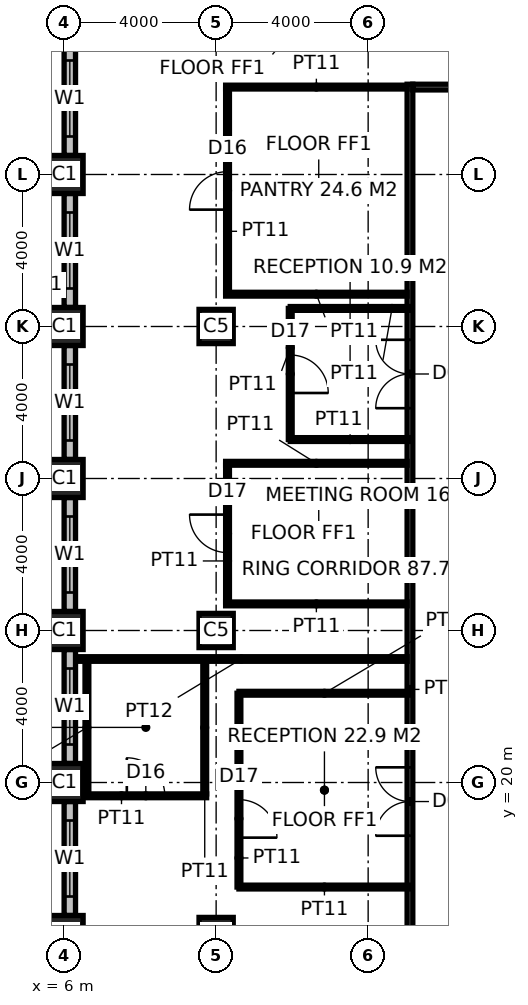
"""IFC4 building model, lengths in metres.
Left out: names, types, materials, properties, quantities, classifications, styles, units other than length and angle.
Written with IfcOpenShell. Run it as: python <this file> out.ifc"""

import sys

from ifc_helpers import new_model, si_unit, direction, frame, frame_2d, origin, origin_2d, place, context, subcontext, project, spatial, rectangle, hollow_rectangle, extrude, element, fill, save


model = new_model("IFC4")
c1 = context("Model", 3, precision=1e-05, world=origin(), true_north=direction((0.0, 1.0)))
c2 = subcontext(c1, "Body", "Model", "MODEL_VIEW")
j1 = project(units=[si_unit("LENGTHUNIT", "METRE"), si_unit("PLANEANGLEUNIT", "RADIAN")], contexts=[c1])
p1 = place(None, origin())
s1 = spatial("IfcSite", under=j1, at=p1, CompositionType="ELEMENT")
p2 = place(p1, origin())
s2 = spatial("IfcBuilding", under=s1, at=p2, CompositionType="ELEMENT")
p3 = place(p2, frame((0.0, 0.0, 175.8)))
s3 = spatial("IfcBuildingStorey", under=s2, at=p3, CompositionType="ELEMENT", Elevation=175.8)
for number, where, z_axis, x_axis in (
    (1, (6.0, 16.0, 0.0), (0.0, 0.0, 1.0), (1.0, 0.0, 0.0)),
    (2, (6.0, 20.0, 0.0), (0.0, 0.0, 1.0), (1.0, 0.0, 0.0)),
    (3, (6.0, 24.0, 0.0), (0.0, 0.0, 1.0), (1.0, 0.0, 0.0)),
    (4, (6.0, 28.0, 0.0), (0.0, 0.0, 1.0), (1.0, 0.0, 0.0)),
    (5, (6.0, 32.0, 0.0), (0.0, 0.0, 1.0), (1.0, 0.0, 0.0)),
    (6, (6.0, 36.0, 0.0), (0.0, 0.0, 1.0), (1.0, 0.0, 0.0)),
):
    element("IfcColumn", number, at=place(p3, frame(where, z_axis=z_axis, x_axis=x_axis)), inside=s3, PredefinedType="COLUMN", context=c2, shape_type="SweptSolid", body=[
        extrude(hollow_rectangle(XDim=1.0, YDim=1.0, WallThickness=0.1, at=origin_2d()), origin(), (0.0, 0.0, 1.0), 4.0),
    ])
for number, where, z_axis, x_axis in (
    (7, (10.0, 16.0, 0.0), (0.0, 0.0, 1.0), (1.0, 0.0, 0.0)),
    (8, (10.0, 24.0, 0.0), (0.0, 0.0, 1.0), (1.0, 0.0, 0.0)),
    (9, (10.0, 32.0, 0.0), (0.0, 0.0, 1.0), (1.0, 0.0, 0.0)),
):
    element("IfcColumn", number, at=place(p3, frame(where, z_axis=z_axis, x_axis=x_axis)), inside=s3, PredefinedType="COLUMN", context=c2, shape_type="SweptSolid", body=[
        extrude(hollow_rectangle(XDim=0.9, YDim=0.9, WallThickness=0.1, at=origin_2d()), origin(), (0.0, 0.0, 1.0), 4.0),
    ])
p4 = place(p3, frame((15.1, 15.625, 0.0), z_axis=(0.0, 0.0, 1.0), x_axis=(0.0, 1.0, 0.0)))
e10 = element("IfcWall", 10, at=p4, inside=s3, PredefinedType="PARTITIONING", context=c2, shape_type="SweptSolid", body=[
    extrude(rectangle(XDim=22.75, YDim=0.15, at=frame_2d((11.375, 0.0))), origin(), (0.0, 0.0, 1.0), 3.85),
])
p5 = place(p4, frame((2.974, 0.0, 0.0)))
e11 = element("IfcOpeningElement", 11, at=p5, cuts=e10, PredefinedType="OPENING", context=c2, shape_type="SweptSolid", body=[
    extrude(rectangle(XDim=1.8, YDim=2.4, at=frame_2d((0.9, 1.2))), frame((0.0, 0.085, 0.0), z_axis=(0.0, -1.0, 0.0), x_axis=(1.0, 0.0, 0.0)), (0.0, 0.0, 1.0), 0.17),
])
p6 = place(p4, frame((14.225, 0.0, 0.0)))
e12 = element("IfcOpeningElement", 12, at=p6, cuts=e10, PredefinedType="OPENING", context=c2, shape_type="SweptSolid", body=[
    extrude(rectangle(XDim=1.8, YDim=2.4, at=frame_2d((0.9, 1.2))), frame((0.0, 0.085, 0.0), z_axis=(0.0, -1.0, 0.0), x_axis=(1.0, 0.0, 0.0)), (0.0, 0.0, 1.0), 0.17),
])
p7 = place(p3, frame((15.175, 38.3, 0.0), z_axis=(0.0, 0.0, 1.0), x_axis=(1.0, 0.0, 0.0)))
e13 = element("IfcWall", 13, at=p7, inside=s3, PredefinedType="PARTITIONING", context=c2, shape_type="SweptSolid", body=[
    extrude(rectangle(XDim=22.65, YDim=0.15, at=frame_2d((11.325, 0.0))), origin(), (0.0, 0.0, 1.0), 3.85),
])
p8 = place(p7, frame((8.575, 0.0, 0.0)))
e14 = element("IfcOpeningElement", 14, at=p8, cuts=e13, PredefinedType="OPENING", context=c2, shape_type="SweptSolid", body=[
    extrude(rectangle(XDim=0.9, YDim=2.1, at=frame_2d((0.45, 1.05))), frame((0.0, 0.085, 0.0), z_axis=(0.0, -1.0, 0.0), x_axis=(1.0, 0.0, 0.0)), (0.0, 0.0, 1.0), 0.17),
])
p9 = place(p7, frame((12.325, 0.0, 0.0)))
e15 = element("IfcOpeningElement", 15, at=p9, cuts=e13, PredefinedType="OPENING", context=c2, shape_type="SweptSolid", body=[
    extrude(rectangle(XDim=1.0, YDim=2.1, at=frame_2d((0.5, 1.05))), frame((0.0, 0.085, 0.0), z_axis=(0.0, -1.0, 0.0), x_axis=(1.0, 0.0, 0.0)), (0.0, 0.0, 1.0), 0.17),
])
p10 = place(p7, frame((16.175, 0.0, 0.0)))
e16 = element("IfcOpeningElement", 16, at=p10, cuts=e13, PredefinedType="OPENING", context=c2, shape_type="SweptSolid", body=[
    extrude(rectangle(XDim=0.9, YDim=2.1, at=frame_2d((0.45, 1.05))), frame((0.0, 0.085, 0.0), z_axis=(0.0, -1.0, 0.0), x_axis=(1.0, 0.0, 0.0)), (0.0, 0.0, 1.0), 0.17),
])
p11 = place(p3, frame((6.3, 23.25, 0.0), z_axis=(0.0, 0.0, 1.0), x_axis=(1.0, 0.0, 0.0)))
e17 = element("IfcWall", 17, at=p11, inside=s3, PredefinedType="PARTITIONING", context=c2, shape_type="SweptSolid", body=[
    extrude(rectangle(XDim=8.725, YDim=0.12, at=frame_2d((4.362, 0.0))), origin(), (0.0, 0.0, 1.0), 3.85),
])
p12 = place(p3, frame((6.55, 19.65, 0.0), z_axis=(0.0, 0.0, 1.0), x_axis=(1.0, 0.0, 0.0)))
e18 = element("IfcWall", 18, at=p12, inside=s3, PredefinedType="PARTITIONING", context=c2, shape_type="SweptSolid", body=[
    extrude(rectangle(XDim=3.2, YDim=0.1, at=frame_2d((1.6, 0.0))), origin(), (0.0, 0.0, 1.0), 2.85),
])
p13 = place(p12, frame((1.1, 0.0, 0.0)))
e19 = element("IfcOpeningElement", 19, at=p13, cuts=e18, PredefinedType="OPENING", context=c2, shape_type="SweptSolid", body=[
    extrude(rectangle(XDim=1.0, YDim=2.2, at=frame_2d((0.5, 1.1))), frame((0.0, 0.06, 0.0), z_axis=(0.0, -1.0, 0.0), x_axis=(1.0, 0.0, 0.0)), (0.0, 0.0, 1.0), 0.12),
])
for number, where, z_axis, x_axis in (
    (20, (10.25, 24.7, 0.0), (0.0, 0.0, 1.0), (1.0, 0.0, 0.0)),
    (21, (10.25, 28.4, 0.0), (0.0, 0.0, 1.0), (1.0, 0.0, 0.0)),
    (22, (10.25, 32.85, 0.0), (0.0, 0.0, 1.0), (1.0, 0.0, 0.0)),
    (23, (10.25, 38.3, 0.0), (0.0, 0.0, 1.0), (1.0, 0.0, 0.0)),
):
    element("IfcWall", number, at=place(p3, frame(where, z_axis=z_axis, x_axis=x_axis)), inside=s3, PredefinedType="PARTITIONING", context=c2, shape_type="SweptSolid", body=[
        extrude(rectangle(XDim=4.775, YDim=0.1, at=frame_2d((2.387, 0.0))), origin(), (0.0, 0.0, 1.0), 3.85),
    ])
for number, where, z_axis, x_axis in (
    (24, (6.6, 19.7, 0.0), (0.0, 0.0, 1.0), (0.0, 1.0, 0.0)),
    (25, (9.7, 19.7, 0.0), (0.0, 0.0, 1.0), (0.0, 1.0, 0.0)),
):
    element("IfcWall", number, at=place(p3, frame(where, z_axis=z_axis, x_axis=x_axis)), inside=s3, PredefinedType="PARTITIONING", context=c2, shape_type="SweptSolid", body=[
        extrude(rectangle(XDim=3.49, YDim=0.1, at=frame_2d((1.745, 0.0))), origin(), (0.0, 0.0, 1.0), 3.85),
    ])
p14 = place(p3, frame((10.3, 24.75, 0.0), z_axis=(0.0, 0.0, 1.0), x_axis=(0.0, 1.0, 0.0)))
e26 = element("IfcWall", 26, at=p14, inside=s3, PredefinedType="PARTITIONING", context=c2, shape_type="SweptSolid", body=[
    extrude(rectangle(XDim=3.6, YDim=0.1, at=frame_2d((1.8, 0.0))), origin(), (0.0, 0.0, 1.0), 3.85),
])
p15 = place(p14, frame((1.3, 0.0, 0.0)))
e27 = element("IfcOpeningElement", 27, at=p15, cuts=e26, PredefinedType="OPENING", context=c2, shape_type="SweptSolid", body=[
    extrude(rectangle(XDim=1.0, YDim=2.2, at=frame_2d((0.5, 1.1))), frame((0.0, 0.06, 0.0), z_axis=(0.0, -1.0, 0.0), x_axis=(1.0, 0.0, 0.0)), (0.0, 0.0, 1.0), 0.12),
])
p16 = place(p3, frame((10.3, 32.9, 0.0), z_axis=(0.0, 0.0, 1.0), x_axis=(0.0, 1.0, 0.0)))
e28 = element("IfcWall", 28, at=p16, inside=s3, PredefinedType="PARTITIONING", context=c2, shape_type="SweptSolid", body=[
    extrude(rectangle(XDim=5.35, YDim=0.1, at=frame_2d((2.675, 0.0))), origin(), (0.0, 0.0, 1.0), 2.95),
])
p17 = place(p16, frame((2.175, 0.0, 0.0)))
e29 = element("IfcOpeningElement", 29, at=p17, cuts=e28, PredefinedType="OPENING", context=c2, shape_type="SweptSolid", body=[
    extrude(rectangle(XDim=1.0, YDim=2.2, at=frame_2d((0.5, 1.1))), frame((0.0, 0.06, 0.0), z_axis=(0.0, -1.0, 0.0), x_axis=(1.0, 0.0, 0.0)), (0.0, 0.0, 1.0), 0.12),
])
p18 = place(p3, frame((15.1, 22.349, 0.0), z_axis=(0.0, 0.0, 1.0), x_axis=(-1.0, 0.0, 0.0)))
e30 = element("IfcWall", 30, at=p18, inside=s3, PredefinedType="PARTITIONING", context=c2, shape_type="SweptSolid", body=[
    extrude(rectangle(XDim=4.5, YDim=0.1, at=frame_2d((2.25, 0.0))), origin(), (0.0, 0.0, 1.0), 3.85),
])
p19 = place(p3, frame((10.6, 22.349, 0.0), z_axis=(0.0, 0.0, 1.0), x_axis=(0.0, -1.0, 0.0)))
e31 = element("IfcWall", 31, at=p19, inside=s3, PredefinedType="PARTITIONING", context=c2, shape_type="SweptSolid", body=[
    extrude(rectangle(XDim=5.1, YDim=0.1, at=frame_2d((2.55, 0.0))), origin(), (0.0, 0.0, 1.0), 3.85),
])
p20 = place(p19, frame((2.8, 0.0, 0.0)))
e32 = element("IfcOpeningElement", 32, at=p20, cuts=e31, PredefinedType="OPENING", context=c2, shape_type="SweptSolid", body=[
    extrude(rectangle(XDim=1.0, YDim=2.2, at=frame_2d((0.5, 1.1))), frame((0.0, 0.06, 0.0), z_axis=(0.0, -1.0, 0.0), x_axis=(1.0, 0.0, 0.0)), (0.0, 0.0, 1.0), 0.12),
])
p21 = place(p3, frame((10.6, 17.249, 0.0), z_axis=(0.0, 0.0, 1.0), x_axis=(1.0, 0.0, 0.0)))
e33 = element("IfcWall", 33, at=p21, inside=s3, PredefinedType="PARTITIONING", context=c2, shape_type="SweptSolid", body=[
    extrude(rectangle(XDim=4.5, YDim=0.1, at=frame_2d((2.25, 0.0))), origin(), (0.0, 0.0, 1.0), 3.85),
])
p22 = place(p3, frame((15.1, 32.475, 0.0), z_axis=(0.0, 0.0, 1.0), x_axis=(-1.0, 0.0, 0.0)))
e34 = element("IfcWall", 34, at=p22, inside=s3, PredefinedType="PARTITIONING", context=c2, shape_type="SweptSolid", body=[
    extrude(rectangle(XDim=3.15, YDim=0.1, at=frame_2d((1.575, 0.0))), origin(), (0.0, 0.0, 1.0), 3.85),
])
p23 = place(p3, frame((11.95, 32.475, 0.0), z_axis=(0.0, 0.0, 1.0), x_axis=(0.0, -1.0, 0.0)))
e35 = element("IfcWall", 35, at=p23, inside=s3, PredefinedType="PARTITIONING", context=c2, shape_type="SweptSolid", body=[
    extrude(rectangle(XDim=3.45, YDim=0.1, at=frame_2d((1.725, 0.0))), origin(), (0.0, 0.0, 1.0), 3.85),
])
p24 = place(p23, frame((1.225, 0.0, 0.0)))
e36 = element("IfcOpeningElement", 36, at=p24, cuts=e35, PredefinedType="OPENING", context=c2, shape_type="SweptSolid", body=[
    extrude(rectangle(XDim=1.0, YDim=2.2, at=frame_2d((0.5, 1.1))), frame((0.0, 0.06, 0.0), z_axis=(0.0, -1.0, 0.0), x_axis=(1.0, 0.0, 0.0)), (0.0, 0.0, 1.0), 0.12),
])
p25 = place(p3, frame((11.95, 29.025, 0.0), z_axis=(0.0, 0.0, 1.0), x_axis=(1.0, 0.0, 0.0)))
e37 = element("IfcWall", 37, at=p25, inside=s3, PredefinedType="PARTITIONING", context=c2, shape_type="SweptSolid", body=[
    extrude(rectangle(XDim=3.15, YDim=0.1, at=frame_2d((1.575, 0.0))), origin(), (0.0, 0.0, 1.0), 3.85),
])
p26 = place(p3, frame((6.15, 19.5, 0.0), z_axis=(0.0, 0.0, 1.0), x_axis=(0.0, -1.0, 0.0)))
e38 = element("IfcWall", 38, at=p26, inside=s3, PredefinedType="ELEMENTEDWALL", context=c2, shape_type="SweptSolid", body=[
    extrude(rectangle(XDim=3.0, YDim=0.3, at=frame_2d((1.5, 0.0))), origin(), (0.0, 0.0, 1.0), 2.85),
])
p27 = place(p26, frame((0.5, 0.0, 0.8)))
e39 = element("IfcOpeningElement", 39, at=p27, cuts=e38, PredefinedType="OPENING", context=c2, shape_type="SweptSolid", body=[
    extrude(rectangle(XDim=2.0, YDim=2.0, at=frame_2d((1.0, 1.0))), frame((0.0, 0.16, 0.0), z_axis=(0.0, -1.0, 0.0), x_axis=(1.0, 0.0, 0.0)), (0.0, 0.0, 1.0), 0.32),
])
p28 = place(p3, frame((6.15, 23.5, 0.0), z_axis=(0.0, 0.0, 1.0), x_axis=(0.0, -1.0, 0.0)))
e40 = element("IfcWall", 40, at=p28, inside=s3, PredefinedType="ELEMENTEDWALL", context=c2, shape_type="SweptSolid", body=[
    extrude(rectangle(XDim=3.0, YDim=0.3, at=frame_2d((1.5, 0.0))), origin(), (0.0, 0.0, 1.0), 2.85),
])
p29 = place(p28, frame((0.5, 0.0, 0.8)))
e41 = element("IfcOpeningElement", 41, at=p29, cuts=e40, PredefinedType="OPENING", context=c2, shape_type="SweptSolid", body=[
    extrude(rectangle(XDim=2.0, YDim=2.0, at=frame_2d((1.0, 1.0))), frame((0.0, 0.16, 0.0), z_axis=(0.0, -1.0, 0.0), x_axis=(1.0, 0.0, 0.0)), (0.0, 0.0, 1.0), 0.32),
])
p30 = place(p3, frame((6.15, 27.5, 0.0), z_axis=(0.0, 0.0, 1.0), x_axis=(0.0, -1.0, 0.0)))
e42 = element("IfcWall", 42, at=p30, inside=s3, PredefinedType="ELEMENTEDWALL", context=c2, shape_type="SweptSolid", body=[
    extrude(rectangle(XDim=3.0, YDim=0.3, at=frame_2d((1.5, 0.0))), origin(), (0.0, 0.0, 1.0), 2.85),
])
p31 = place(p30, frame((0.5, 0.0, 0.8)))
e43 = element("IfcOpeningElement", 43, at=p31, cuts=e42, PredefinedType="OPENING", context=c2, shape_type="SweptSolid", body=[
    extrude(rectangle(XDim=2.0, YDim=2.0, at=frame_2d((1.0, 1.0))), frame((0.0, 0.16, 0.0), z_axis=(0.0, -1.0, 0.0), x_axis=(1.0, 0.0, 0.0)), (0.0, 0.0, 1.0), 0.32),
])
p32 = place(p3, frame((6.15, 31.5, 0.0), z_axis=(0.0, 0.0, 1.0), x_axis=(0.0, -1.0, 0.0)))
e44 = element("IfcWall", 44, at=p32, inside=s3, PredefinedType="ELEMENTEDWALL", context=c2, shape_type="SweptSolid", body=[
    extrude(rectangle(XDim=3.0, YDim=0.3, at=frame_2d((1.5, 0.0))), origin(), (0.0, 0.0, 1.0), 2.85),
])
p33 = place(p32, frame((0.5, 0.0, 0.8)))
e45 = element("IfcOpeningElement", 45, at=p33, cuts=e44, PredefinedType="OPENING", context=c2, shape_type="SweptSolid", body=[
    extrude(rectangle(XDim=2.0, YDim=2.0, at=frame_2d((1.0, 1.0))), frame((0.0, 0.16, 0.0), z_axis=(0.0, -1.0, 0.0), x_axis=(1.0, 0.0, 0.0)), (0.0, 0.0, 1.0), 0.32),
])
p34 = place(p3, frame((6.15, 35.5, 0.0), z_axis=(0.0, 0.0, 1.0), x_axis=(0.0, -1.0, 0.0)))
e46 = element("IfcWall", 46, at=p34, inside=s3, PredefinedType="ELEMENTEDWALL", context=c2, shape_type="SweptSolid", body=[
    extrude(rectangle(XDim=3.0, YDim=0.3, at=frame_2d((1.5, 0.0))), origin(), (0.0, 0.0, 1.0), 2.85),
])
p35 = place(p34, frame((0.5, 0.0, 0.8)))
e47 = element("IfcOpeningElement", 47, at=p35, cuts=e46, PredefinedType="OPENING", context=c2, shape_type="SweptSolid", body=[
    extrude(rectangle(XDim=2.0, YDim=2.0, at=frame_2d((1.0, 1.0))), frame((0.0, 0.16, 0.0), z_axis=(0.0, -1.0, 0.0), x_axis=(1.0, 0.0, 0.0)), (0.0, 0.0, 1.0), 0.32),
])
p36 = place(p3, frame((6.15, 39.5, 0.0), z_axis=(0.0, 0.0, 1.0), x_axis=(0.0, -1.0, 0.0)))
e48 = element("IfcWall", 48, at=p36, inside=s3, PredefinedType="ELEMENTEDWALL", context=c2, shape_type="SweptSolid", body=[
    extrude(rectangle(XDim=3.0, YDim=0.3, at=frame_2d((1.5, 0.0))), origin(), (0.0, 0.0, 1.0), 2.85),
])
p37 = place(p36, frame((0.5, 0.0, 0.8)))
e49 = element("IfcOpeningElement", 49, at=p37, cuts=e48, PredefinedType="OPENING", context=c2, shape_type="SweptSolid", body=[
    extrude(rectangle(XDim=2.0, YDim=2.0, at=frame_2d((1.0, 1.0))), frame((0.0, 0.16, 0.0), z_axis=(0.0, -1.0, 0.0), x_axis=(1.0, 0.0, 0.0)), (0.0, 0.0, 1.0), 0.32),
])
p38 = place(p5, origin())
e50 = element("IfcDoor", 50, at=p38, inside=s3, OperationType="DOUBLE_DOOR_DOUBLE_SWING", PredefinedType="DOOR", context=c2, shape_type="SweptSolid", body=[
    extrude(rectangle(XDim=1.8, YDim=2.4, at=frame_2d((0.9, 1.2))), frame((0.0, 0.025, 0.0), z_axis=(0.0, -1.0, 0.0), x_axis=(1.0, 0.0, 0.0)), (0.0, 0.0, 1.0), 0.05),
])
fill(e11, e50)
p39 = place(p6, origin())
e51 = element("IfcDoor", 51, at=p39, inside=s3, OperationType="DOUBLE_DOOR_DOUBLE_SWING", PredefinedType="DOOR", context=c2, shape_type="SweptSolid", body=[
    extrude(rectangle(XDim=1.8, YDim=2.4, at=frame_2d((0.9, 1.2))), frame((0.0, 0.025, 0.0), z_axis=(0.0, -1.0, 0.0), x_axis=(1.0, 0.0, 0.0)), (0.0, 0.0, 1.0), 0.05),
])
fill(e12, e51)
p40 = place(p17, origin())
e52 = element("IfcDoor", 52, at=p40, inside=s3, OperationType="SINGLE_SWING_LEFT", PredefinedType="DOOR", context=c2, shape_type="SweptSolid", body=[
    extrude(rectangle(XDim=1.0, YDim=2.2, at=frame_2d((0.5, 1.1))), frame((0.0, 0.025, 0.0), z_axis=(0.0, -1.0, 0.0), x_axis=(1.0, 0.0, 0.0)), (0.0, 0.0, 1.0), 0.05),
])
fill(e29, e52)
p41 = place(p13, origin())
e53 = element("IfcDoor", 53, at=p41, inside=s3, OperationType="SINGLE_SWING_LEFT", PredefinedType="DOOR", context=c2, shape_type="SweptSolid", body=[
    extrude(rectangle(XDim=1.0, YDim=2.2, at=frame_2d((0.5, 1.1))), frame((0.0, 0.025, 0.0), z_axis=(0.0, -1.0, 0.0), x_axis=(1.0, 0.0, 0.0)), (0.0, 0.0, 1.0), 0.05),
])
fill(e19, e53)
p42 = place(p15, origin())
e54 = element("IfcDoor", 54, at=p42, inside=s3, OperationType="SINGLE_SWING_RIGHT", PredefinedType="DOOR", context=c2, shape_type="SweptSolid", body=[
    extrude(rectangle(XDim=1.0, YDim=2.2, at=frame_2d((0.5, 1.1))), frame((0.0, 0.025, 0.0), z_axis=(0.0, -1.0, 0.0), x_axis=(1.0, 0.0, 0.0)), (0.0, 0.0, 1.0), 0.05),
])
fill(e27, e54)
p43 = place(p20, origin())
e55 = element("IfcDoor", 55, at=p43, inside=s3, OperationType="SINGLE_SWING_RIGHT", PredefinedType="DOOR", context=c2, shape_type="SweptSolid", body=[
    extrude(rectangle(XDim=1.0, YDim=2.2, at=frame_2d((0.5, 1.1))), frame((0.0, 0.025, 0.0), z_axis=(0.0, -1.0, 0.0), x_axis=(1.0, 0.0, 0.0)), (0.0, 0.0, 1.0), 0.05),
])
fill(e32, e55)
p44 = place(p24, origin())
e56 = element("IfcDoor", 56, at=p44, inside=s3, OperationType="SINGLE_SWING_RIGHT", PredefinedType="DOOR", context=c2, shape_type="SweptSolid", body=[
    extrude(rectangle(XDim=1.0, YDim=2.2, at=frame_2d((0.5, 1.1))), frame((0.0, 0.025, 0.0), z_axis=(0.0, -1.0, 0.0), x_axis=(1.0, 0.0, 0.0)), (0.0, 0.0, 1.0), 0.05),
])
fill(e36, e56)
p45 = place(p27, origin())
e57 = element("IfcWindow", 57, at=p45, inside=s3, PartitioningType="SINGLE_PANEL", PredefinedType="WINDOW", context=c2, shape_type="SweptSolid", body=[
    extrude(rectangle(XDim=2.0, YDim=2.0, at=frame_2d((1.0, 1.0))), frame((0.0, 0.03, 0.0), z_axis=(0.0, -1.0, 0.0), x_axis=(1.0, 0.0, 0.0)), (0.0, 0.0, 1.0), 0.06),
])
fill(e39, e57)
p46 = place(p29, origin())
e58 = element("IfcWindow", 58, at=p46, inside=s3, PartitioningType="SINGLE_PANEL", PredefinedType="WINDOW", context=c2, shape_type="SweptSolid", body=[
    extrude(rectangle(XDim=2.0, YDim=2.0, at=frame_2d((1.0, 1.0))), frame((0.0, 0.03, 0.0), z_axis=(0.0, -1.0, 0.0), x_axis=(1.0, 0.0, 0.0)), (0.0, 0.0, 1.0), 0.06),
])
fill(e41, e58)
p47 = place(p31, origin())
e59 = element("IfcWindow", 59, at=p47, inside=s3, PartitioningType="SINGLE_PANEL", PredefinedType="WINDOW", context=c2, shape_type="SweptSolid", body=[
    extrude(rectangle(XDim=2.0, YDim=2.0, at=frame_2d((1.0, 1.0))), frame((0.0, 0.03, 0.0), z_axis=(0.0, -1.0, 0.0), x_axis=(1.0, 0.0, 0.0)), (0.0, 0.0, 1.0), 0.06),
])
fill(e43, e59)
p48 = place(p33, origin())
e60 = element("IfcWindow", 60, at=p48, inside=s3, PartitioningType="SINGLE_PANEL", PredefinedType="WINDOW", context=c2, shape_type="SweptSolid", body=[
    extrude(rectangle(XDim=2.0, YDim=2.0, at=frame_2d((1.0, 1.0))), frame((0.0, 0.03, 0.0), z_axis=(0.0, -1.0, 0.0), x_axis=(1.0, 0.0, 0.0)), (0.0, 0.0, 1.0), 0.06),
])
fill(e45, e60)
p49 = place(p35, origin())
e61 = element("IfcWindow", 61, at=p49, inside=s3, PartitioningType="SINGLE_PANEL", PredefinedType="WINDOW", context=c2, shape_type="SweptSolid", body=[
    extrude(rectangle(XDim=2.0, YDim=2.0, at=frame_2d((1.0, 1.0))), frame((0.0, 0.03, 0.0), z_axis=(0.0, -1.0, 0.0), x_axis=(1.0, 0.0, 0.0)), (0.0, 0.0, 1.0), 0.06),
])
fill(e47, e61)
p50 = place(p37, origin())
e62 = element("IfcWindow", 62, at=p50, inside=s3, PartitioningType="SINGLE_PANEL", PredefinedType="WINDOW", context=c2, shape_type="SweptSolid", body=[
    extrude(rectangle(XDim=2.0, YDim=2.0, at=frame_2d((1.0, 1.0))), frame((0.0, 0.03, 0.0), z_axis=(0.0, -1.0, 0.0), x_axis=(1.0, 0.0, 0.0)), (0.0, 0.0, 1.0), 0.06),
])
fill(e49, e62)
save(model, sys.argv[1])
